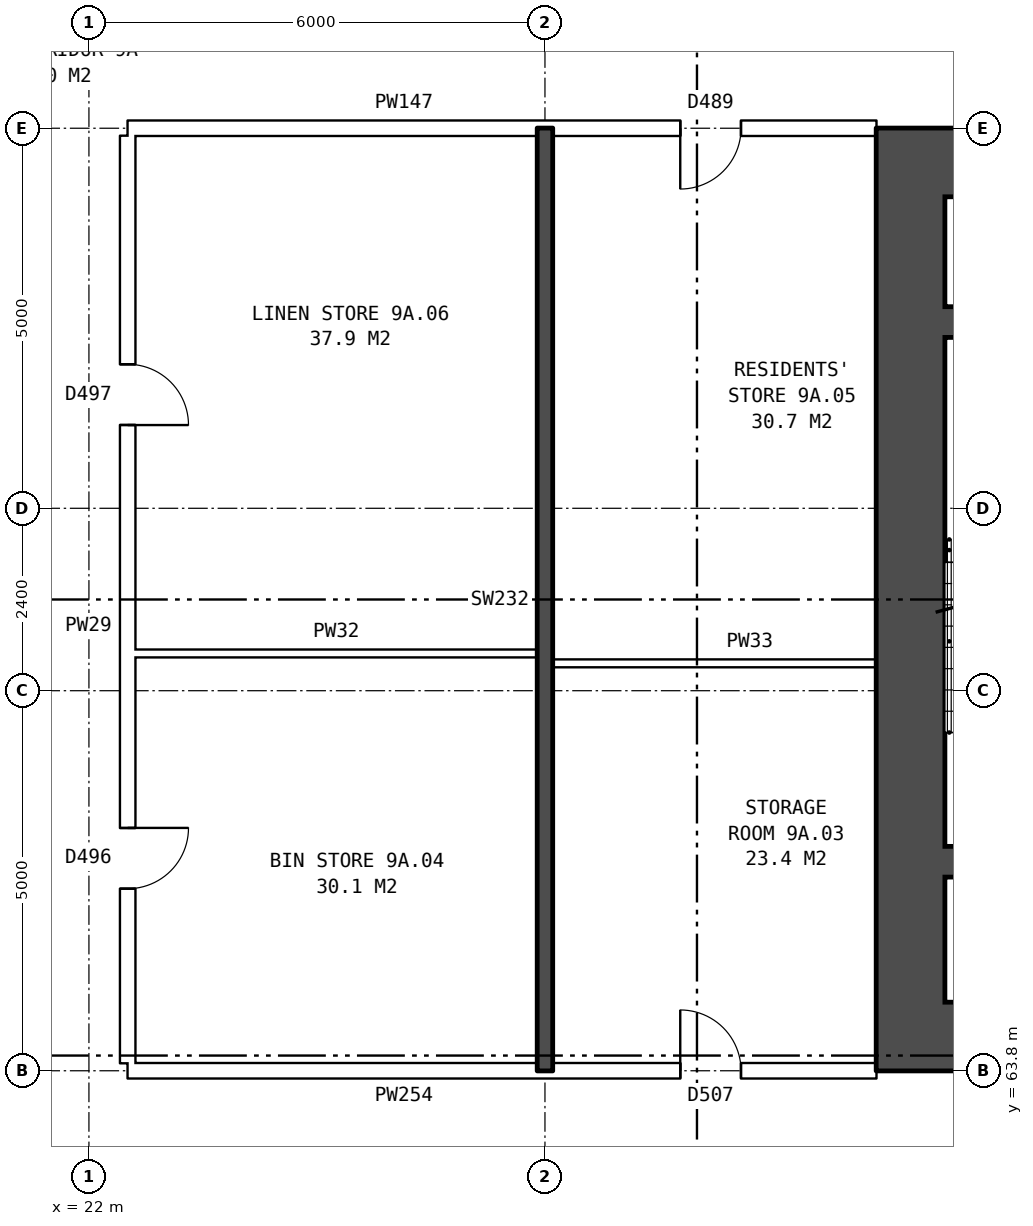
"""IFC4 building model, lengths in metres.
Left out: names, types, materials, properties, quantities, classifications, styles, units other than length and angle.
Written with IfcOpenShell. Run it as: python <this file> out.ifc"""

import sys

from ifc_helpers import new_model, si_unit, direction, frame, frame_2d, origin, place, context, subcontext, project, spatial, rectangle, extrude, element, fill, save


model = new_model("IFC4")
c1 = context("Model", 3, precision=1e-05, world=origin(), true_north=direction((0.0, 1.0)))
c2 = subcontext(c1, "Body", "Model", "MODEL_VIEW")
j1 = project(units=[si_unit("LENGTHUNIT", "METRE"), si_unit("PLANEANGLEUNIT", "RADIAN")], contexts=[c1])
p1 = place(None, origin())
s1 = spatial("IfcSite", under=j1, at=p1, CompositionType="ELEMENT")
p2 = place(p1, origin())
s2 = spatial("IfcBuilding", under=s1, at=p2, CompositionType="ELEMENT")
p3 = place(p2, frame((0.0, 0.0, 35.0)))
s3 = spatial("IfcBuildingStorey", under=s2, at=p3, CompositionType="ELEMENT", Elevation=35.0)
p4 = place(p3, frame((32.81, 75.3, 0.0), z_axis=(0.0, 0.0, 1.0), x_axis=(0.0, -1.0, 0.0)))
e1 = element("IfcWall", 1, at=p4, inside=s3, PredefinedType="SHEAR", context=c2, shape_type="SweptSolid", body=[
    extrude(rectangle(XDim=10.6, YDim=0.9, at=frame_2d((5.3, 0.0))), origin(), (0.0, 0.0, 1.0), 2.85),
])
for number, where, z_axis, x_axis in (
    (2, (41.36, 75.75, 0.0), (0.0, 0.0, 1.0), (-1.0, 0.0, 0.0)),
    (3, (41.36, 64.25, 0.0), (0.0, 0.0, 1.0), (-1.0, 0.0, 0.0)),
):
    element("IfcWall", number, at=place(p3, frame(where, z_axis=z_axis, x_axis=x_axis)), inside=s3, PredefinedType="SHEAR", context=c2, shape_type="SweptSolid", body=[
        extrude(rectangle(XDim=9.0, YDim=0.9, at=frame_2d((4.5, 0.0))), origin(), (0.0, 0.0, 1.0), 2.85),
    ])
p5 = place(p3, frame((36.26, 73.65, 0.0), z_axis=(0.0, 0.0, 1.0), x_axis=(-1.0, 0.0, 0.0)))
e4 = element("IfcWall", 4, at=p5, inside=s3, PredefinedType="SHEAR", context=c2, shape_type="SweptSolid", body=[
    extrude(rectangle(XDim=3.0, YDim=0.4, at=frame_2d((1.5, 0.0))), origin(), (0.0, 0.0, 1.0), 2.85),
])
p6 = place(p3, frame((36.26, 66.55, 0.0), z_axis=(0.0, 0.0, 1.0), x_axis=(-1.0, 0.0, 0.0)))
e5 = element("IfcWall", 5, at=p6, inside=s3, PredefinedType="SHEAR", context=c2, shape_type="SweptSolid", body=[
    extrude(rectangle(XDim=3.0, YDim=0.4, at=frame_2d((1.5, 0.0))), origin(), (0.0, 0.0, 1.0), 2.85),
])
p7 = place(p6, frame((0.22, 0.0, 0.0)))
e6 = element("IfcOpeningElement", 6, at=p7, cuts=e5, PredefinedType="OPENING", context=c2, shape_type="SweptSolid", body=[
    extrude(rectangle(XDim=1.1, YDim=2.1, at=frame_2d((0.55, 1.05))), frame((0.0, 0.21, 0.0), z_axis=(0.0, -1.0, 0.0), x_axis=(1.0, 0.0, 0.0)), (0.0, 0.0, 1.0), 0.42),
])
p8 = place(p3, frame((22.51, 63.8, 0.0), z_axis=(0.0, 0.0, 1.0), x_axis=(1.0, 0.0, 0.0)))
e7 = element("IfcWall", 7, at=p8, inside=s3, PredefinedType="PARTITIONING", context=c2, shape_type="SweptSolid", body=[
    extrude(rectangle(XDim=9.85, YDim=0.2, at=frame_2d((4.925, 0.0))), origin(), (0.0, 0.0, 1.0), 2.85),
])
p9 = place(p8, frame((7.27, 0.0, 0.0)))
e8 = element("IfcOpeningElement", 8, at=p9, cuts=e7, PredefinedType="OPENING", context=c2, shape_type="SweptSolid", body=[
    extrude(rectangle(XDim=0.8, YDim=2.1, at=frame_2d((0.4, 1.05))), frame((0.0, 0.11, 0.0), z_axis=(0.0, -1.0, 0.0), x_axis=(1.0, 0.0, 0.0)), (0.0, 0.0, 1.0), 0.22),
])
p10 = place(p3, frame((28.1, 69.16, 0.0), z_axis=(0.0, 0.0, 1.0), x_axis=(1.0, 0.0, 0.0)))
e9 = element("IfcWall", 9, at=p10, inside=s3, PredefinedType="PARTITIONING", context=c2, shape_type="SweptSolid", body=[
    extrude(rectangle(XDim=4.26, YDim=0.1, at=frame_2d((2.13, 0.0))), origin(), (0.0, 0.0, 1.0), 2.85),
])
p11 = place(p3, frame((22.61, 69.29, 0.0), z_axis=(0.0, 0.0, 1.0), x_axis=(1.0, 0.0, 0.0)))
e10 = element("IfcWall", 10, at=p11, inside=s3, PredefinedType="PARTITIONING", context=c2, shape_type="SweptSolid", body=[
    extrude(rectangle(XDim=5.29, YDim=0.1, at=frame_2d((2.645, 0.0))), origin(), (0.0, 0.0, 1.0), 2.85),
])
p12 = place(p3, frame((22.51, 76.2, 0.0), z_axis=(0.0, 0.0, 1.0), x_axis=(1.0, 0.0, 0.0)))
e11 = element("IfcWall", 11, at=p12, inside=s3, PredefinedType="PARTITIONING", context=c2, shape_type="SweptSolid", body=[
    extrude(rectangle(XDim=9.85, YDim=0.2, at=frame_2d((4.925, 0.0))), origin(), (0.0, 0.0, 1.0), 2.85),
])
p13 = place(p12, frame((7.27, 0.0, 0.0)))
e12 = element("IfcOpeningElement", 12, at=p13, cuts=e11, PredefinedType="OPENING", context=c2, shape_type="SweptSolid", body=[
    extrude(rectangle(XDim=0.8, YDim=2.1, at=frame_2d((0.4, 1.05))), frame((0.0, 0.11, 0.0), z_axis=(0.0, -1.0, 0.0), x_axis=(1.0, 0.0, 0.0)), (0.0, 0.0, 1.0), 0.22),
])
p14 = place(p3, frame((22.51, 63.9, 0.0), z_axis=(0.0, 0.0, 1.0), x_axis=(0.0, 1.0, 0.0)))
e13 = element("IfcWall", 13, at=p14, inside=s3, PredefinedType="PARTITIONING", context=c2, shape_type="SweptSolid", body=[
    extrude(rectangle(XDim=12.2, YDim=0.2, at=frame_2d((6.1, 0.0))), origin(), (0.0, 0.0, 1.0), 2.85),
])
p15 = place(p14, frame((2.295, 0.0, 0.0)))
e14 = element("IfcOpeningElement", 14, at=p15, cuts=e13, PredefinedType="OPENING", context=c2, shape_type="SweptSolid", body=[
    extrude(rectangle(XDim=0.8, YDim=2.1, at=frame_2d((0.4, 1.05))), frame((0.0, 0.11, 0.0), z_axis=(0.0, -1.0, 0.0), x_axis=(1.0, 0.0, 0.0)), (0.0, 0.0, 1.0), 0.22),
])
p16 = place(p14, frame((8.395, 0.0, 0.0)))
e15 = element("IfcOpeningElement", 15, at=p16, cuts=e13, PredefinedType="OPENING", context=c2, shape_type="SweptSolid", body=[
    extrude(rectangle(XDim=0.8, YDim=2.1, at=frame_2d((0.4, 1.05))), frame((0.0, 0.11, 0.0), z_axis=(0.0, -1.0, 0.0), x_axis=(1.0, 0.0, 0.0)), (0.0, 0.0, 1.0), 0.22),
])
p17 = place(p3, frame((28.0, 63.8, 0.0), z_axis=(0.0, 0.0, 1.0), x_axis=(0.0, 1.0, 0.0)))
e16 = element("IfcWall", 16, at=p17, inside=s3, PredefinedType="SOLIDWALL", context=c2, shape_type="SweptSolid", body=[
    extrude(rectangle(XDim=12.4, YDim=0.2, at=frame_2d((6.2, 0.0))), origin(), (0.0, 0.0, 1.0), 2.85),
])
p18 = place(p9, origin())
e17 = element("IfcDoor", 17, at=p18, inside=s3, OperationType="SINGLE_SWING_LEFT", PredefinedType="DOOR", context=c2, shape_type="SweptSolid", body=[
    extrude(rectangle(XDim=0.8, YDim=2.1, at=frame_2d((0.4, 1.05))), frame((0.0, 0.025, 0.0), z_axis=(0.0, -1.0, 0.0), x_axis=(1.0, 0.0, 0.0)), (0.0, 0.0, 1.0), 0.05),
])
fill(e8, e17)
p19 = place(p15, frame((0.8, 0.0, 0.0), z_axis=(0.0, 0.0, 1.0), x_axis=(-1.0, 0.0, 0.0)))
e18 = element("IfcDoor", 18, at=p19, inside=s3, OperationType="SINGLE_SWING_LEFT", PredefinedType="DOOR", context=c2, shape_type="SweptSolid", body=[
    extrude(rectangle(XDim=0.8, YDim=2.1, at=frame_2d((0.4, 1.05))), frame((0.0, 0.025, 0.0), z_axis=(0.0, -1.0, 0.0), x_axis=(1.0, 0.0, 0.0)), (0.0, 0.0, 1.0), 0.05),
])
fill(e14, e18)
p20 = place(p13, frame((0.8, 0.0, 0.0), z_axis=(0.0, 0.0, 1.0), x_axis=(-1.0, 0.0, 0.0)))
e19 = element("IfcDoor", 19, at=p20, inside=s3, OperationType="SINGLE_SWING_RIGHT", PredefinedType="DOOR", context=c2, shape_type="SweptSolid", body=[
    extrude(rectangle(XDim=0.8, YDim=2.1, at=frame_2d((0.4, 1.05))), frame((0.0, 0.025, 0.0), z_axis=(0.0, -1.0, 0.0), x_axis=(1.0, 0.0, 0.0)), (0.0, 0.0, 1.0), 0.05),
])
fill(e12, e19)
p21 = place(p16, frame((0.8, 0.0, 0.0), z_axis=(0.0, 0.0, 1.0), x_axis=(-1.0, 0.0, 0.0)))
e20 = element("IfcDoor", 20, at=p21, inside=s3, OperationType="SINGLE_SWING_RIGHT", PredefinedType="DOOR", context=c2, shape_type="SweptSolid", body=[
    extrude(rectangle(XDim=0.8, YDim=2.1, at=frame_2d((0.4, 1.05))), frame((0.0, 0.025, 0.0), z_axis=(0.0, -1.0, 0.0), x_axis=(1.0, 0.0, 0.0)), (0.0, 0.0, 1.0), 0.05),
])
fill(e15, e20)
save(model, sys.argv[1])
